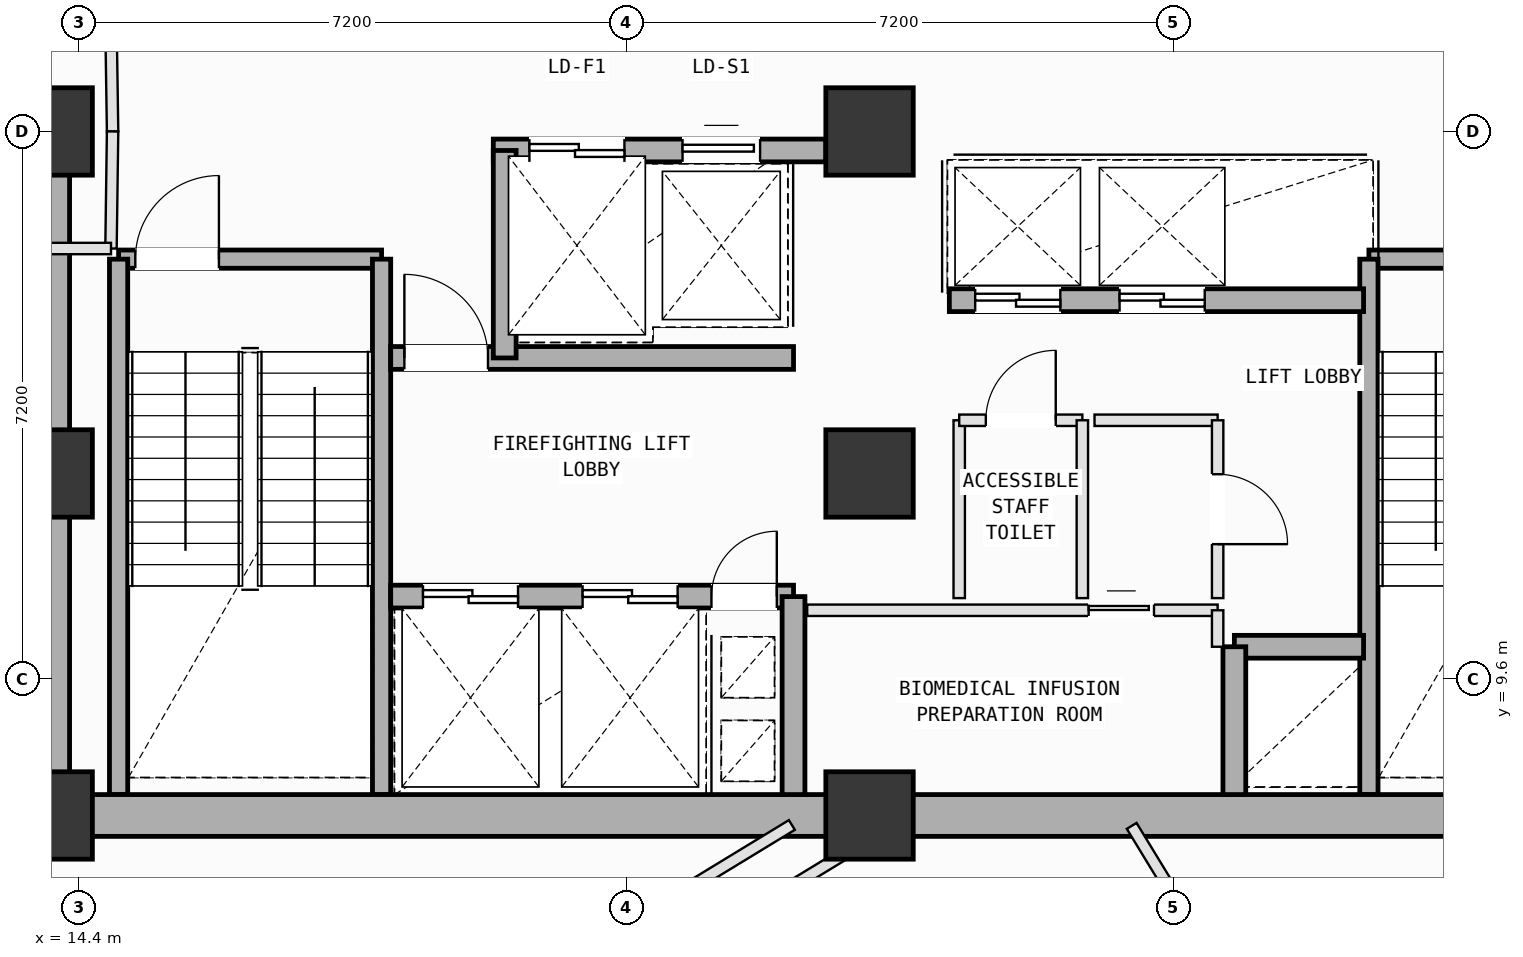
"""IFC4 building model, lengths in metres.
Left out: names, types, materials, properties, quantities, classifications, styles, units other than length and angle.
Written with IfcOpenShell. Run it as: python <this file> out.ifc"""

import sys

from ifc_helpers import new_model, si_unit, direction, frame, frame_2d, origin, origin_2d, place, context, subcontext, project, spatial, rectangle, extrude, element, fill, save


model = new_model("IFC4")
c1 = context("Model", 3, precision=1e-05, world=origin(), true_north=direction((0.0, 1.0)))
c2 = subcontext(c1, "Body", "Model", "MODEL_VIEW")
j1 = project(units=[si_unit("LENGTHUNIT", "METRE"), si_unit("PLANEANGLEUNIT", "RADIAN")], contexts=[c1])
p1 = place(None, origin())
s1 = spatial("IfcSite", under=j1, at=p1, CompositionType="ELEMENT")
p2 = place(p1, origin())
s2 = spatial("IfcBuilding", under=s1, at=p2, CompositionType="ELEMENT")
p3 = place(p2, frame((0.0, 0.0, 157.8)))
s3 = spatial("IfcBuildingStorey", under=s2, at=p3, CompositionType="ELEMENT", Elevation=157.8)
for number, where, z_axis, x_axis in (
    (1, (14.0, 7.8, 0.0), (0.0, 0.0, 1.0), (1.0, 0.0, 0.0)),
    (2, (14.0, 12.3, 0.0), (0.0, 0.0, 1.0), (1.0, 0.0, 0.0)),
    (3, (14.0, 16.8, 0.0), (0.0, 0.0, 1.0), (1.0, 0.0, 0.0)),
    (4, (24.8, 7.8, 0.0), (0.0, 0.0, 1.0), (1.0, 0.0, 0.0)),
    (5, (24.8, 12.3, 0.0), (0.0, 0.0, 1.0), (1.0, 0.0, 0.0)),
    (6, (24.8, 16.8, 0.0), (0.0, 0.0, 1.0), (1.0, 0.0, 0.0)),
):
    element("IfcColumn", number, at=place(p3, frame(where, z_axis=z_axis, x_axis=x_axis)), inside=s3, PredefinedType="COLUMN", context=c2, shape_type="SweptSolid", body=[
        extrude(rectangle(XDim=1.15, YDim=1.15, at=origin_2d()), origin(), (0.0, 0.0, 1.0), 4.0),
    ])
p4 = place(p3, frame((14.92, 15.12, 0.0), z_axis=(0.0, 0.0, 1.0), x_axis=(1.0, 0.0, 0.0)))
e7 = element("IfcWall", 7, at=p4, inside=s3, PredefinedType="SOLIDWALL", context=c2, shape_type="SweptSolid", body=[
    extrude(rectangle(XDim=3.46, YDim=0.24, at=frame_2d((1.73, 0.0))), origin(), (0.0, 0.0, 1.0), 3.78),
])
p5 = place(p4, frame((0.22, 0.0, 0.0)))
e8 = element("IfcOpeningElement", 8, at=p5, cuts=e7, PredefinedType="OPENING", context=c2, shape_type="SweptSolid", body=[
    extrude(rectangle(XDim=1.1, YDim=2.15, at=frame_2d((0.55, 1.075))), frame((0.0, 0.13, 0.0), z_axis=(0.0, -1.0, 0.0), x_axis=(1.0, 0.0, 0.0)), (0.0, 0.0, 1.0), 0.26),
])
for number, where, z_axis, x_axis in (
    (9, (18.38, 15.12, 0.0), (0.0, 0.0, 1.0), (0.0, -1.0, 0.0)),
    (10, (14.92, 8.075, 0.0), (0.0, 0.0, 1.0), (0.0, 1.0, 0.0)),
):
    element("IfcWall", number, at=place(p3, frame(where, z_axis=z_axis, x_axis=x_axis)), inside=s3, PredefinedType="SOLIDWALL", context=c2, shape_type="SweptSolid", body=[
        extrude(rectangle(XDim=7.045, YDim=0.24, at=frame_2d((3.522, 0.0))), origin(), (0.0, 0.0, 1.0), 3.78),
    ])
p6 = place(p3, frame((31.37, 15.12, 0.0), z_axis=(0.0, 0.0, 1.0), x_axis=(1.0, 0.0, 0.0)))
e11 = element("IfcWall", 11, at=p6, inside=s3, PredefinedType="SOLIDWALL", context=c2, shape_type="SweptSolid", body=[
    extrude(rectangle(XDim=3.46, YDim=0.24, at=frame_2d((1.73, 0.0))), origin(), (0.0, 0.0, 1.0), 3.78),
])
p7 = place(p6, frame((2.14, 0.0, 0.0)))
e12 = element("IfcOpeningElement", 12, at=p7, cuts=e11, PredefinedType="OPENING", context=c2, shape_type="SweptSolid", body=[
    extrude(rectangle(XDim=1.1, YDim=2.15, at=frame_2d((0.55, 1.075))), frame((0.0, 0.13, 0.0), z_axis=(0.0, -1.0, 0.0), x_axis=(1.0, 0.0, 0.0)), (0.0, 0.0, 1.0), 0.26),
])
p8 = place(p3, frame((31.37, 8.075, 0.0), z_axis=(0.0, 0.0, 1.0), x_axis=(0.0, 1.0, 0.0)))
e13 = element("IfcWall", 13, at=p8, inside=s3, PredefinedType="SOLIDWALL", context=c2, shape_type="SweptSolid", body=[
    extrude(rectangle(XDim=7.045, YDim=0.24, at=frame_2d((3.522, 0.0))), origin(), (0.0, 0.0, 1.0), 3.78),
])
for number, where, z_axis, x_axis in (
    (14, (14.0, 7.8, 0.0), (0.0, 0.0, 1.0), (1.0, 0.0, 0.0)),
    (15, (24.8, 7.8, 0.0), (0.0, 0.0, 1.0), (1.0, 0.0, 0.0)),
):
    element("IfcWall", number, at=place(p3, frame(where, z_axis=z_axis, x_axis=x_axis)), inside=s3, PredefinedType="SHEAR", context=c2, shape_type="SweptSolid", body=[
        extrude(rectangle(XDim=10.8, YDim=0.55, at=frame_2d((5.4, 0.0))), origin(), (0.0, 0.0, 1.0), 3.78),
    ])
p9 = place(p3, frame((14.0, 16.8, 0.0), z_axis=(0.0, 0.0, 1.0), x_axis=(0.0, -1.0, 0.0)))
e16 = element("IfcWall", 16, at=p9, inside=s3, PredefinedType="SHEAR", context=c2, shape_type="SweptSolid", body=[
    extrude(rectangle(XDim=9.0, YDim=0.55, at=frame_2d((4.5, 0.0))), origin(), (0.0, 0.0, 1.0), 3.78),
])
p10 = place(p3, frame((19.85, 16.55, 0.0), z_axis=(0.0, 0.0, 1.0), x_axis=(1.0, 0.0, 0.0)))
e17 = element("IfcWall", 17, at=p10, inside=s3, PredefinedType="SOLIDWALL", context=c2, shape_type="SweptSolid", body=[
    extrude(rectangle(XDim=4.375, YDim=0.3, at=frame_2d((2.188, 0.0))), origin(), (0.0, 0.0, 1.0), 3.78),
])
p11 = place(p10, frame((0.475, 0.0, 0.0)))
e18 = element("IfcOpeningElement", 18, at=p11, cuts=e17, PredefinedType="OPENING", context=c2, shape_type="SweptSolid", body=[
    extrude(rectangle(XDim=1.25, YDim=2.18, at=frame_2d((0.625, 1.09))), frame((0.0, 0.16, 0.0), z_axis=(0.0, -1.0, 0.0), x_axis=(1.0, 0.0, 0.0)), (0.0, 0.0, 1.0), 0.32),
])
p12 = place(p10, frame((2.49, 0.0, 0.0)))
e19 = element("IfcOpeningElement", 19, at=p12, cuts=e17, PredefinedType="OPENING", context=c2, shape_type="SweptSolid", body=[
    extrude(rectangle(XDim=1.02, YDim=2.12, at=frame_2d((0.51, 1.06))), frame((0.0, 0.16, 0.0), z_axis=(0.0, -1.0, 0.0), x_axis=(1.0, 0.0, 0.0)), (0.0, 0.0, 1.0), 0.32),
])
p13 = place(p3, frame((18.5, 10.68, 0.0), z_axis=(0.0, 0.0, 1.0), x_axis=(1.0, 0.0, 0.0)))
e20 = element("IfcWall", 20, at=p13, inside=s3, PredefinedType="SOLIDWALL", context=c2, shape_type="SweptSolid", body=[
    extrude(rectangle(XDim=5.3, YDim=0.3, at=frame_2d((2.65, 0.0))), origin(), (0.0, 0.0, 1.0), 3.78),
])
p14 = place(p13, frame((4.22, 0.0, 0.0)))
e21 = element("IfcOpeningElement", 21, at=p14, cuts=e20, PredefinedType="OPENING", context=c2, shape_type="SweptSolid", body=[
    extrude(rectangle(XDim=0.86, YDim=2.06, at=frame_2d((0.43, 1.03))), frame((0.0, 0.16, 0.0), z_axis=(0.0, -1.0, 0.0), x_axis=(1.0, 0.0, 0.0)), (0.0, 0.0, 1.0), 0.32),
])
p15 = place(p13, frame((0.425, 0.0, 0.0)))
e22 = element("IfcOpeningElement", 22, at=p15, cuts=e20, PredefinedType="OPENING", context=c2, shape_type="SweptSolid", body=[
    extrude(rectangle(XDim=1.25, YDim=2.18, at=frame_2d((0.625, 1.09))), frame((0.0, 0.16, 0.0), z_axis=(0.0, -1.0, 0.0), x_axis=(1.0, 0.0, 0.0)), (0.0, 0.0, 1.0), 0.32),
])
p16 = place(p13, frame((2.525, 0.0, 0.0)))
e23 = element("IfcOpeningElement", 23, at=p16, cuts=e20, PredefinedType="OPENING", context=c2, shape_type="SweptSolid", body=[
    extrude(rectangle(XDim=1.25, YDim=2.18, at=frame_2d((0.625, 1.09))), frame((0.0, 0.16, 0.0), z_axis=(0.0, -1.0, 0.0), x_axis=(1.0, 0.0, 0.0)), (0.0, 0.0, 1.0), 0.32),
])
p17 = place(p3, frame((18.5, 13.82, 0.0), z_axis=(0.0, 0.0, 1.0), x_axis=(1.0, 0.0, 0.0)))
e24 = element("IfcWall", 24, at=p17, inside=s3, PredefinedType="SOLIDWALL", context=c2, shape_type="SweptSolid", body=[
    extrude(rectangle(XDim=5.3, YDim=0.3, at=frame_2d((2.65, 0.0))), origin(), (0.0, 0.0, 1.0), 3.78),
])
p18 = place(p17, frame((0.18, 0.0, 0.0)))
e25 = element("IfcOpeningElement", 25, at=p18, cuts=e24, PredefinedType="OPENING", context=c2, shape_type="SweptSolid", body=[
    extrude(rectangle(XDim=1.1, YDim=2.15, at=frame_2d((0.55, 1.075))), frame((0.0, 0.16, 0.0), z_axis=(0.0, -1.0, 0.0), x_axis=(1.0, 0.0, 0.0)), (0.0, 0.0, 1.0), 0.32),
])
p19 = place(p3, frame((23.8, 8.075, 0.0), z_axis=(0.0, 0.0, 1.0), x_axis=(0.0, 1.0, 0.0)))
e26 = element("IfcWall", 26, at=p19, inside=s3, PredefinedType="SOLIDWALL", context=c2, shape_type="SweptSolid", body=[
    extrude(rectangle(XDim=2.605, YDim=0.3, at=frame_2d((1.302, 0.0))), origin(), (0.0, 0.0, 1.0), 3.78),
])
p20 = place(p3, frame((20.0, 13.82, 0.0), z_axis=(0.0, 0.0, 1.0), x_axis=(0.0, 1.0, 0.0)))
e27 = element("IfcWall", 27, at=p20, inside=s3, PredefinedType="SOLIDWALL", context=c2, shape_type="SweptSolid", body=[
    extrude(rectangle(XDim=2.73, YDim=0.3, at=frame_2d((1.365, 0.0))), origin(), (0.0, 0.0, 1.0), 3.78),
])
p21 = place(p3, frame((29.6, 10.02, 0.0), z_axis=(0.0, 0.0, 1.0), x_axis=(1.0, 0.0, 0.0)))
e28 = element("IfcWall", 28, at=p21, inside=s3, PredefinedType="SOLIDWALL", context=c2, shape_type="SweptSolid", body=[
    extrude(rectangle(XDim=1.7, YDim=0.3, at=frame_2d((0.85, 0.0))), origin(), (0.0, 0.0, 1.0), 3.78),
])
p22 = place(p3, frame((29.6, 8.075, 0.0), z_axis=(0.0, 0.0, 1.0), x_axis=(0.0, 1.0, 0.0)))
e29 = element("IfcWall", 29, at=p22, inside=s3, PredefinedType="SOLIDWALL", context=c2, shape_type="SweptSolid", body=[
    extrude(rectangle(XDim=1.945, YDim=0.3, at=frame_2d((0.973, 0.0))), origin(), (0.0, 0.0, 1.0), 3.78),
])
p23 = place(p3, frame((25.85, 14.58, 0.0), z_axis=(0.0, 0.0, 1.0), x_axis=(1.0, 0.0, 0.0)))
e30 = element("IfcWall", 30, at=p23, inside=s3, PredefinedType="SOLIDWALL", context=c2, shape_type="SweptSolid", body=[
    extrude(rectangle(XDim=5.45, YDim=0.3, at=frame_2d((2.725, 0.0))), origin(), (0.0, 0.0, 1.0), 3.78),
])
p24 = place(p23, frame((0.34, 0.0, 0.0)))
e31 = element("IfcOpeningElement", 31, at=p24, cuts=e30, PredefinedType="OPENING", context=c2, shape_type="SweptSolid", body=[
    extrude(rectangle(XDim=1.12, YDim=2.15, at=frame_2d((0.56, 1.075))), frame((0.0, 0.16, 0.0), z_axis=(0.0, -1.0, 0.0), x_axis=(1.0, 0.0, 0.0)), (0.0, 0.0, 1.0), 0.32),
])
p25 = place(p23, frame((2.24, 0.0, 0.0)))
e32 = element("IfcOpeningElement", 32, at=p25, cuts=e30, PredefinedType="OPENING", context=c2, shape_type="SweptSolid", body=[
    extrude(rectangle(XDim=1.12, YDim=2.15, at=frame_2d((0.56, 1.075))), frame((0.0, 0.16, 0.0), z_axis=(0.0, -1.0, 0.0), x_axis=(1.0, 0.0, 0.0)), (0.0, 0.0, 1.0), 0.32),
])
p26 = place(p3, frame((23.98, 10.5, 0.0), z_axis=(0.0, 0.0, 1.0), x_axis=(1.0, 0.0, 0.0)))
e33 = element("IfcWall", 33, at=p26, inside=s3, PredefinedType="PARTITIONING", context=c2, shape_type="SweptSolid", body=[
    extrude(rectangle(XDim=5.4, YDim=0.15, at=frame_2d((2.7, 0.0))), origin(), (0.0, 0.0, 1.0), 3.78),
])
p27 = place(p26, frame((3.703, 0.0, 0.0)))
e34 = element("IfcOpeningElement", 34, at=p27, cuts=e33, PredefinedType="OPENING", context=c2, shape_type="SweptSolid", body=[
    extrude(rectangle(XDim=0.86, YDim=2.06, at=frame_2d((0.43, 1.03))), frame((0.0, 0.085, 0.0), z_axis=(0.0, -1.0, 0.0), x_axis=(1.0, 0.0, 0.0)), (0.0, 0.0, 1.0), 0.17),
])
p28 = place(p3, frame((29.38, 10.5, 0.0), z_axis=(0.0, 0.0, 1.0), x_axis=(0.0, -1.0, 0.0)))
e35 = element("IfcWall", 35, at=p28, inside=s3, PredefinedType="PARTITIONING", context=c2, shape_type="SweptSolid", body=[
    extrude(rectangle(XDim=0.48, YDim=0.15, at=frame_2d((0.24, 0.0))), origin(), (0.0, 0.0, 1.0), 3.78),
])
p29 = place(p3, frame((25.98, 10.66, 0.0), z_axis=(0.0, 0.0, 1.0), x_axis=(0.0, 1.0, 0.0)))
e36 = element("IfcWall", 36, at=p29, inside=s3, PredefinedType="PARTITIONING", context=c2, shape_type="SweptSolid", body=[
    extrude(rectangle(XDim=2.34, YDim=0.15, at=frame_2d((1.17, 0.0))), origin(), (0.0, 0.0, 1.0), 3.78),
])
p30 = place(p3, frame((25.98, 13.0, 0.0), z_axis=(0.0, 0.0, 1.0), x_axis=(1.0, 0.0, 0.0)))
e37 = element("IfcWall", 37, at=p30, inside=s3, PredefinedType="PARTITIONING", context=c2, shape_type="SweptSolid", body=[
    extrude(rectangle(XDim=1.62, YDim=0.15, at=frame_2d((0.81, 0.0))), origin(), (0.0, 0.0, 1.0), 3.78),
])
p31 = place(p30, frame((0.35, 0.0, 0.0)))
e38 = element("IfcOpeningElement", 38, at=p31, cuts=e37, PredefinedType="OPENING", context=c2, shape_type="SweptSolid", body=[
    extrude(rectangle(XDim=0.92, YDim=2.1, at=frame_2d((0.46, 1.05))), frame((0.0, 0.085, 0.0), z_axis=(0.0, -1.0, 0.0), x_axis=(1.0, 0.0, 0.0)), (0.0, 0.0, 1.0), 0.17),
])
p32 = place(p3, frame((27.6, 13.0, 0.0), z_axis=(0.0, 0.0, 1.0), x_axis=(0.0, -1.0, 0.0)))
e39 = element("IfcWall", 39, at=p32, inside=s3, PredefinedType="PARTITIONING", context=c2, shape_type="SweptSolid", body=[
    extrude(rectangle(XDim=2.34, YDim=0.15, at=frame_2d((1.17, 0.0))), origin(), (0.0, 0.0, 1.0), 3.78),
])
p33 = place(p3, frame((27.76, 13.0, 0.0), z_axis=(0.0, 0.0, 1.0), x_axis=(1.0, 0.0, 0.0)))
e40 = element("IfcWall", 40, at=p33, inside=s3, PredefinedType="PARTITIONING", context=c2, shape_type="SweptSolid", body=[
    extrude(rectangle(XDim=1.62, YDim=0.15, at=frame_2d((0.81, 0.0))), origin(), (0.0, 0.0, 1.0), 3.78),
])
p34 = place(p3, frame((29.38, 13.0, 0.0), z_axis=(0.0, 0.0, 1.0), x_axis=(0.0, -1.0, 0.0)))
e41 = element("IfcWall", 41, at=p34, inside=s3, PredefinedType="PARTITIONING", context=c2, shape_type="SweptSolid", body=[
    extrude(rectangle(XDim=2.34, YDim=0.15, at=frame_2d((1.17, 0.0))), origin(), (0.0, 0.0, 1.0), 3.78),
])
p35 = place(p34, frame((0.71, 0.0, 0.0)))
e42 = element("IfcOpeningElement", 42, at=p35, cuts=e41, PredefinedType="OPENING", context=c2, shape_type="SweptSolid", body=[
    extrude(rectangle(XDim=0.92, YDim=2.1, at=frame_2d((0.46, 1.05))), frame((0.0, 0.085, 0.0), z_axis=(0.0, -1.0, 0.0), x_axis=(1.0, 0.0, 0.0)), (0.0, 0.0, 1.0), 0.17),
])
p36 = place(p3, frame((22.745, 6.243, 0.0), z_axis=(0.0, 0.0, 1.0), x_axis=(0.853950619488, 0.520354052041, 0.0)))
e43 = element("IfcWall", 43, at=p36, inside=s3, PredefinedType="PARTITIONING", context=c2, shape_type="SweptSolid", body=[
    extrude(rectangle(XDim=2.416, YDim=0.15, at=frame_2d((1.208, 0.0))), origin(), (0.0, 0.0, 1.0), 3.78),
])
p37 = place(p3, frame((28.249, 7.663, 0.0), z_axis=(0.0, 0.0, 1.0), x_axis=(0.520338524303, -0.853960081108, 0.0)))
e44 = element("IfcWall", 44, at=p37, inside=s3, PredefinedType="PARTITIONING", context=c2, shape_type="SweptSolid", body=[
    extrude(rectangle(XDim=10.284, YDim=0.15, at=frame_2d((5.142, 0.0))), origin(), (0.0, 0.0, 1.0), 3.78),
])
p38 = place(p37, frame((4.888, 0.0, 0.0)))
e45 = element("IfcOpeningElement", 45, at=p38, cuts=e44, PredefinedType="OPENING", context=c2, shape_type="SweptSolid", body=[
    extrude(rectangle(XDim=0.86, YDim=2.06, at=frame_2d((0.43, 1.03))), frame((0.0, 0.085, 0.0), z_axis=(0.0, -1.0, 0.0), x_axis=(1.0, 0.0, 0.0)), (0.0, 0.0, 1.0), 0.17),
])
p39 = place(p3, frame((23.778, 7.675, 0.0), z_axis=(0.0, 0.0, 1.0), x_axis=(-0.854003106526, -0.520267906029, 0.0)))
e46 = element("IfcWall", 46, at=p39, inside=s3, PredefinedType="PARTITIONING", context=c2, shape_type="SweptSolid", body=[
    extrude(rectangle(XDim=10.037, YDim=0.15, at=frame_2d((5.019, 0.0))), origin(), (0.0, 0.0, 1.0), 3.78),
])
p40 = place(p3, frame((14.82, 18.2, 0.0), z_axis=(0.0, 0.0, 1.0), x_axis=(0.01499656939, -0.99988754513, 0.0)))
e47 = element("IfcWall", 47, at=p40, inside=s3, PredefinedType="PARTITIONING", context=c2, shape_type="SweptSolid", body=[
    extrude(rectangle(XDim=1.4, YDim=0.15, at=frame_2d((0.7, 0.0))), origin(), (0.0, 0.0, 1.0), 3.78),
])
p41 = place(p3, frame((14.841, 16.8, 0.0), z_axis=(0.0, 0.0, 1.0), x_axis=(-0.01363221443, -0.999907077048, 0.0)))
e48 = element("IfcWall", 48, at=p41, inside=s3, PredefinedType="PARTITIONING", context=c2, shape_type="SweptSolid", body=[
    extrude(rectangle(XDim=1.54, YDim=0.15, at=frame_2d((0.77, 0.0))), origin(), (0.0, 0.0, 1.0), 3.78),
])
p42 = place(p3, frame((14.82, 15.26, 0.0), z_axis=(0.0, 0.0, 1.0), x_axis=(-1.0, 0.0, 0.0)))
e49 = element("IfcWall", 49, at=p42, inside=s3, PredefinedType="PARTITIONING", context=c2, shape_type="SweptSolid", body=[
    extrude(rectangle(XDim=1.12, YDim=0.15, at=frame_2d((0.56, 0.0))), origin(), (0.0, 0.0, 1.0), 3.78),
])
p43 = place(p3, frame((7.173, 15.638, 0.0), z_axis=(0.0, 0.0, 1.0), x_axis=(0.854000204459, 0.52027266965, 0.0)))
e50 = element("IfcWall", 50, at=p43, inside=s3, PredefinedType="PARTITIONING", context=c2, shape_type="SweptSolid", body=[
    extrude(rectangle(XDim=9.13, YDim=0.15, at=frame_2d((4.565, 0.0))), origin(), (0.0, 0.0, 1.0), 3.78),
])
p44 = place(p5, origin())
e51 = element("IfcDoor", 51, at=p44, inside=s3, OperationType="SINGLE_SWING_RIGHT", PredefinedType="DOOR", context=c2, shape_type="SweptSolid", body=[
    extrude(rectangle(XDim=1.1, YDim=2.15, at=frame_2d((0.55, 1.075))), frame((0.0, 0.025, 0.0), z_axis=(0.0, -1.0, 0.0), x_axis=(1.0, 0.0, 0.0)), (0.0, 0.0, 1.0), 0.05),
])
fill(e8, e51)
p45 = place(p14, origin())
e52 = element("IfcDoor", 52, at=p45, inside=s3, OperationType="SINGLE_SWING_RIGHT", PredefinedType="DOOR", context=c2, shape_type="SweptSolid", body=[
    extrude(rectangle(XDim=0.86, YDim=2.06, at=frame_2d((0.43, 1.03))), frame((0.0, 0.025, 0.0), z_axis=(0.0, -1.0, 0.0), x_axis=(1.0, 0.0, 0.0)), (0.0, 0.0, 1.0), 0.05),
])
fill(e21, e52)
p46 = place(p18, origin())
e53 = element("IfcDoor", 53, at=p46, inside=s3, OperationType="SINGLE_SWING_LEFT", PredefinedType="DOOR", context=c2, shape_type="SweptSolid", body=[
    extrude(rectangle(XDim=1.1, YDim=2.15, at=frame_2d((0.55, 1.075))), frame((0.0, 0.025, 0.0), z_axis=(0.0, -1.0, 0.0), x_axis=(1.0, 0.0, 0.0)), (0.0, 0.0, 1.0), 0.05),
])
fill(e25, e53)
p47 = place(p15, origin())
e54 = element("IfcDoor", 54, at=p47, inside=s3, OperationType="DOUBLE_DOOR_SLIDING", PredefinedType="DOOR", context=c2, shape_type="SweptSolid", body=[
    extrude(rectangle(XDim=1.25, YDim=2.18, at=frame_2d((0.625, 1.09))), frame((0.0, 0.025, 0.0), z_axis=(0.0, -1.0, 0.0), x_axis=(1.0, 0.0, 0.0)), (0.0, 0.0, 1.0), 0.05),
])
fill(e22, e54)
p48 = place(p16, origin())
e55 = element("IfcDoor", 55, at=p48, inside=s3, OperationType="DOUBLE_DOOR_SLIDING", PredefinedType="DOOR", context=c2, shape_type="SweptSolid", body=[
    extrude(rectangle(XDim=1.25, YDim=2.18, at=frame_2d((0.625, 1.09))), frame((0.0, 0.025, 0.0), z_axis=(0.0, -1.0, 0.0), x_axis=(1.0, 0.0, 0.0)), (0.0, 0.0, 1.0), 0.05),
])
fill(e23, e55)
p49 = place(p24, origin())
e56 = element("IfcDoor", 56, at=p49, inside=s3, OperationType="DOUBLE_DOOR_SLIDING", PredefinedType="DOOR", context=c2, shape_type="SweptSolid", body=[
    extrude(rectangle(XDim=1.12, YDim=2.15, at=frame_2d((0.56, 1.075))), frame((0.0, 0.025, 0.0), z_axis=(0.0, -1.0, 0.0), x_axis=(1.0, 0.0, 0.0)), (0.0, 0.0, 1.0), 0.05),
])
fill(e31, e56)
p50 = place(p25, origin())
e57 = element("IfcDoor", 57, at=p50, inside=s3, OperationType="DOUBLE_DOOR_SLIDING", PredefinedType="DOOR", context=c2, shape_type="SweptSolid", body=[
    extrude(rectangle(XDim=1.12, YDim=2.15, at=frame_2d((0.56, 1.075))), frame((0.0, 0.025, 0.0), z_axis=(0.0, -1.0, 0.0), x_axis=(1.0, 0.0, 0.0)), (0.0, 0.0, 1.0), 0.05),
])
fill(e32, e57)
p51 = place(p11, origin())
e58 = element("IfcDoor", 58, at=p51, inside=s3, OperationType="DOUBLE_DOOR_SLIDING", PredefinedType="DOOR", context=c2, shape_type="SweptSolid", body=[
    extrude(rectangle(XDim=1.25, YDim=2.18, at=frame_2d((0.625, 1.09))), frame((0.0, 0.025, 0.0), z_axis=(0.0, -1.0, 0.0), x_axis=(1.0, 0.0, 0.0)), (0.0, 0.0, 1.0), 0.05),
])
fill(e18, e58)
p52 = place(p12, origin())
e59 = element("IfcDoor", 59, at=p52, inside=s3, OperationType="SLIDING_TO_LEFT", PredefinedType="DOOR", context=c2, shape_type="SweptSolid", body=[
    extrude(rectangle(XDim=1.02, YDim=2.12, at=frame_2d((0.51, 1.06))), frame((0.0, 0.025, 0.0), z_axis=(0.0, -1.0, 0.0), x_axis=(1.0, 0.0, 0.0)), (0.0, 0.0, 1.0), 0.05),
])
fill(e19, e59)
p53 = place(p31, origin())
e60 = element("IfcDoor", 60, at=p53, inside=s3, OperationType="SINGLE_SWING_RIGHT", PredefinedType="DOOR", context=c2, shape_type="SweptSolid", body=[
    extrude(rectangle(XDim=0.92, YDim=2.1, at=frame_2d((0.46, 1.05))), frame((0.0, 0.025, 0.0), z_axis=(0.0, -1.0, 0.0), x_axis=(1.0, 0.0, 0.0)), (0.0, 0.0, 1.0), 0.05),
])
fill(e38, e60)
p54 = place(p35, origin())
e61 = element("IfcDoor", 61, at=p54, inside=s3, OperationType="SINGLE_SWING_RIGHT", PredefinedType="DOOR", context=c2, shape_type="SweptSolid", body=[
    extrude(rectangle(XDim=0.92, YDim=2.1, at=frame_2d((0.46, 1.05))), frame((0.0, 0.025, 0.0), z_axis=(0.0, -1.0, 0.0), x_axis=(1.0, 0.0, 0.0)), (0.0, 0.0, 1.0), 0.05),
])
fill(e42, e61)
p55 = place(p27, origin())
e62 = element("IfcDoor", 62, at=p55, inside=s3, OperationType="SLIDING_TO_LEFT", PredefinedType="DOOR", context=c2, shape_type="SweptSolid", body=[
    extrude(rectangle(XDim=0.86, YDim=2.06, at=frame_2d((0.43, 1.03))), frame((0.0, 0.025, 0.0), z_axis=(0.0, -1.0, 0.0), x_axis=(1.0, 0.0, 0.0)), (0.0, 0.0, 1.0), 0.05),
])
fill(e34, e62)
save(model, sys.argv[1])
